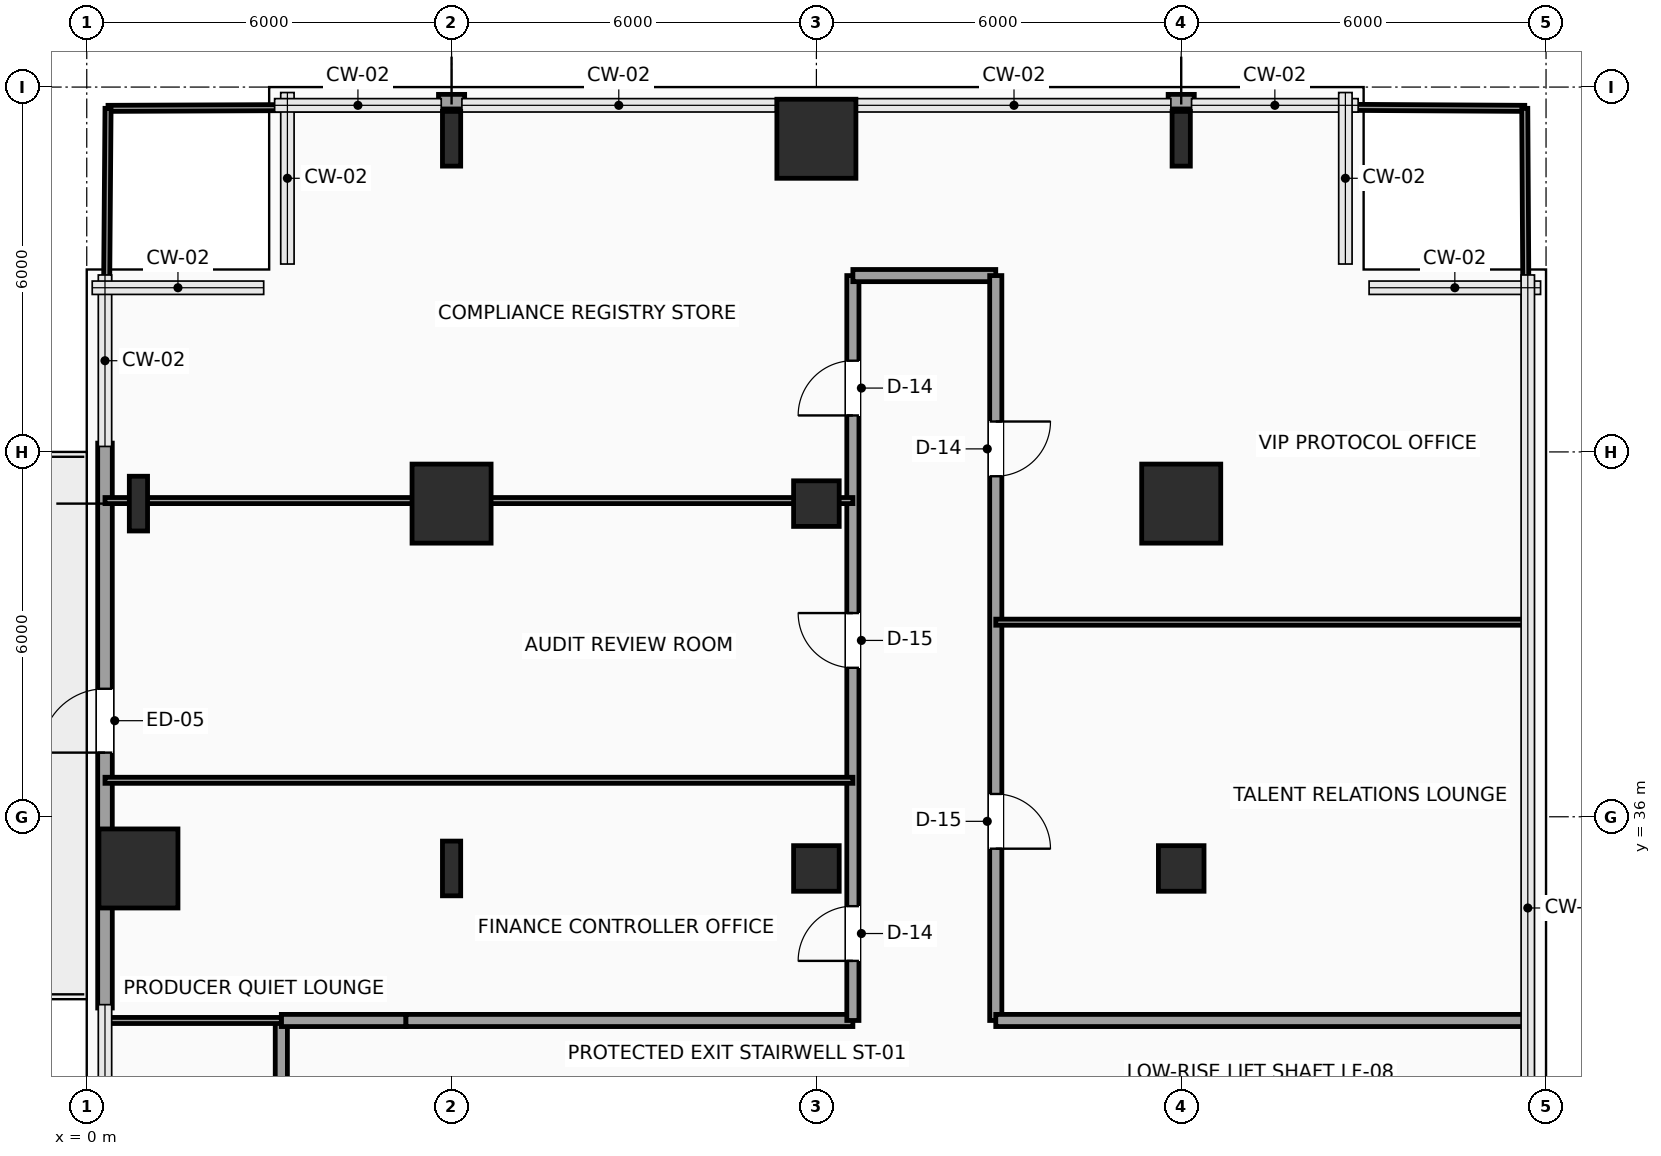
"""IFC4 building model, lengths in metres.
Left out: names, types, materials, properties, quantities, classifications, styles, units other than length and angle.
Written with IfcOpenShell. Run it as: python <this file> out.ifc"""

import sys

from ifc_helpers import new_model, si_unit, direction, frame, frame_2d, origin, origin_2d, place, context, subcontext, project, spatial, rectangle, hollow_rectangle, i_section, extrude, element, fill, save


model = new_model("IFC4")
c1 = context("Model", 3, precision=1e-05, world=origin(), true_north=direction((0.0, 1.0)))
c2 = subcontext(c1, "Body", "Model", "MODEL_VIEW")
j1 = project(units=[si_unit("LENGTHUNIT", "METRE"), si_unit("PLANEANGLEUNIT", "RADIAN")], contexts=[c1])
p1 = place(None, origin())
s1 = spatial("IfcSite", under=j1, at=p1, CompositionType="ELEMENT")
p2 = place(p1, origin())
s2 = spatial("IfcBuilding", under=s1, at=p2, CompositionType="ELEMENT")
p3 = place(p2, frame((0.0, 0.0, 87.0)))
s3 = spatial("IfcBuildingStorey", under=s2, at=p3, CompositionType="ELEMENT", Elevation=87.0)
p4 = place(p3, frame((0.85, 35.15, 0.0), z_axis=(0.0, 0.0, 1.0), x_axis=(1.0, 0.0, 0.0)))
e1 = element("IfcColumn", 1, at=p4, inside=s3, PredefinedType="COLUMN", context=c2, shape_type="SweptSolid", body=[
    extrude(rectangle(XDim=1.3, YDim=1.3, at=origin_2d()), origin(), (0.0, 0.0, 1.0), 3.9),
])
for number, where, z_axis, x_axis in (
    (2, (0.85, 41.15, 0.0), (0.0, 0.0, 1.0), (1.0, 0.0, 0.0)),
    (3, (6.0, 35.15, 0.0), (0.0, 0.0, 1.0), (1.0, 0.0, 0.0)),
):
    element("IfcColumn", number, at=place(p3, frame(where, z_axis=z_axis, x_axis=x_axis)), inside=s3, PredefinedType="COLUMN", context=c2, shape_type="SweptSolid", body=[
        extrude(i_section(OverallWidth=0.3, OverallDepth=0.9, WebThickness=0.019, FlangeThickness=0.035, FilletRadius=0.03, at=origin_2d()), origin(), (0.0, 0.0, 1.0), 3.9),
    ])
p5 = place(p3, frame((6.0, 41.15, 0.0), z_axis=(0.0, 0.0, 1.0), x_axis=(1.0, 0.0, 0.0)))
e4 = element("IfcColumn", 4, at=p5, inside=s3, PredefinedType="COLUMN", context=c2, shape_type="SweptSolid", body=[
    extrude(rectangle(XDim=1.3, YDim=1.3, at=origin_2d()), origin(), (0.0, 0.0, 1.0), 3.9),
])
p6 = place(p3, frame((6.0, 47.15, 0.0), z_axis=(0.0, 0.0, 1.0), x_axis=(1.0, 0.0, 0.0)))
e5 = element("IfcColumn", 5, at=p6, inside=s3, PredefinedType="COLUMN", context=c2, shape_type="SweptSolid", body=[
    extrude(i_section(OverallWidth=0.3, OverallDepth=0.9, WebThickness=0.019, FlangeThickness=0.035, FilletRadius=0.03, at=origin_2d()), origin(), (0.0, 0.0, 1.0), 3.9),
])
for number, where, z_axis, x_axis in (
    (6, (12.0, 35.15, 0.0), (0.0, 0.0, 1.0), (1.0, 0.0, 0.0)),
    (7, (12.0, 41.15, 0.0), (0.0, 0.0, 1.0), (1.0, 0.0, 0.0)),
):
    element("IfcColumn", number, at=place(p3, frame(where, z_axis=z_axis, x_axis=x_axis)), inside=s3, PredefinedType="COLUMN", context=c2, shape_type="SweptSolid", body=[
        extrude(hollow_rectangle(XDim=0.75, YDim=0.75, WallThickness=0.035, InnerFilletRadius=0.035, OuterFilletRadius=0.05, at=origin_2d()), origin(), (0.0, 0.0, 1.0), 3.9),
    ])
p7 = place(p3, frame((12.0, 47.15, 0.0), z_axis=(0.0, 0.0, 1.0), x_axis=(1.0, 0.0, 0.0)))
e8 = element("IfcColumn", 8, at=p7, inside=s3, PredefinedType="COLUMN", context=c2, shape_type="SweptSolid", body=[
    extrude(rectangle(XDim=1.3, YDim=1.3, at=origin_2d()), origin(), (0.0, 0.0, 1.0), 3.9),
])
p8 = place(p3, frame((18.0, 35.15, 0.0), z_axis=(0.0, 0.0, 1.0), x_axis=(1.0, 0.0, 0.0)))
e9 = element("IfcColumn", 9, at=p8, inside=s3, PredefinedType="COLUMN", context=c2, shape_type="SweptSolid", body=[
    extrude(hollow_rectangle(XDim=0.75, YDim=0.75, WallThickness=0.035, InnerFilletRadius=0.035, OuterFilletRadius=0.05, at=origin_2d()), origin(), (0.0, 0.0, 1.0), 3.9),
])
p9 = place(p3, frame((18.0, 41.15, 0.0), z_axis=(0.0, 0.0, 1.0), x_axis=(1.0, 0.0, 0.0)))
e10 = element("IfcColumn", 10, at=p9, inside=s3, PredefinedType="COLUMN", context=c2, shape_type="SweptSolid", body=[
    extrude(rectangle(XDim=1.3, YDim=1.3, at=origin_2d()), origin(), (0.0, 0.0, 1.0), 3.9),
])
p10 = place(p3, frame((18.0, 47.15, 0.0), z_axis=(0.0, 0.0, 1.0), x_axis=(1.0, 0.0, 0.0)))
e11 = element("IfcColumn", 11, at=p10, inside=s3, PredefinedType="COLUMN", context=c2, shape_type="SweptSolid", body=[
    extrude(i_section(OverallWidth=0.3, OverallDepth=0.9, WebThickness=0.019, FlangeThickness=0.035, FilletRadius=0.03, at=origin_2d()), origin(), (0.0, 0.0, 1.0), 3.9),
])
p11 = place(p3, frame((0.3, 32.855, 0.0), z_axis=(0.0, 0.0, 1.0), x_axis=(0.0, 1.0, 0.0)))
e12 = element("IfcWall", 12, at=p11, inside=s3, PredefinedType="SOLIDWALL", context=c2, shape_type="SweptSolid", body=[
    extrude(rectangle(XDim=9.29, YDim=0.24, at=frame_2d((4.645, 0.0))), origin(), (0.0, 0.0, 1.0), 3.65),
])
p12 = place(p11, frame((4.2, 0.0, 0.0)))
e13 = element("IfcOpeningElement", 13, at=p12, cuts=e12, PredefinedType="OPENING", context=c2, shape_type="SweptSolid", body=[
    extrude(rectangle(XDim=1.05, YDim=2.2, at=frame_2d((0.525, 1.1))), frame((0.0, 0.13, 0.0), z_axis=(0.0, -1.0, 0.0), x_axis=(1.0, 0.0, 0.0)), (0.0, 0.0, 1.0), 0.26),
])
for number, where, z_axis, x_axis in (
    (14, (5.785, 47.76, 0.0), (0.0, 0.0, 1.0), (1.0, 0.0, 0.0)),
    (15, (17.785, 47.76, 0.0), (0.0, 0.0, 1.0), (1.0, 0.0, 0.0)),
):
    element("IfcWall", number, at=place(p3, frame(where, z_axis=z_axis, x_axis=x_axis)), inside=s3, PredefinedType="SOLIDWALL", context=c2, shape_type="SweptSolid", body=[
        extrude(rectangle(XDim=0.43, YDim=0.24, at=frame_2d((0.215, 0.0))), origin(), (0.0, 0.0, 1.0), 3.65),
    ])
p13 = place(p3, frame((3.2, 30.25, 0.0), z_axis=(0.0, 0.0, 1.0), x_axis=(0.0, 1.0, 0.0)))
e16 = element("IfcWall", 16, at=p13, inside=s3, PredefinedType="SOLIDWALL", context=c2, shape_type="SweptSolid", body=[
    extrude(rectangle(XDim=2.4, YDim=0.2, at=frame_2d((1.2, 0.0))), origin(), (0.0, 0.0, 1.0), 3.65),
])
p14 = place(p3, frame((3.2, 32.65, 0.0), z_axis=(0.0, 0.0, 1.0), x_axis=(1.0, 0.0, 0.0)))
e17 = element("IfcWall", 17, at=p14, inside=s3, PredefinedType="SOLIDWALL", context=c2, shape_type="SweptSolid", body=[
    extrude(rectangle(XDim=2.05, YDim=0.2, at=frame_2d((1.025, 0.0))), origin(), (0.0, 0.0, 1.0), 3.65),
])
p15 = place(p3, frame((5.25, 32.65, 0.0), z_axis=(0.0, 0.0, 1.0), x_axis=(1.0, 0.0, 0.0)))
e18 = element("IfcWall", 18, at=p15, inside=s3, PredefinedType="SOLIDWALL", context=c2, shape_type="SweptSolid", body=[
    extrude(rectangle(XDim=7.35, YDim=0.2, at=frame_2d((3.675, 0.0))), origin(), (0.0, 0.0, 1.0), 3.65),
])
p16 = place(p3, frame((12.6, 32.65, 0.0), z_axis=(0.0, 0.0, 1.0), x_axis=(0.0, 1.0, 0.0)))
e19 = element("IfcWall", 19, at=p16, inside=s3, PredefinedType="SOLIDWALL", context=c2, shape_type="SweptSolid", body=[
    extrude(rectangle(XDim=12.25, YDim=0.2, at=frame_2d((6.125, 0.0))), origin(), (0.0, 0.0, 1.0), 3.65),
])
p17 = place(p16, frame((0.98, 0.0, 0.0)))
e20 = element("IfcOpeningElement", 20, at=p17, cuts=e19, PredefinedType="OPENING", context=c2, shape_type="SweptSolid", body=[
    extrude(rectangle(XDim=0.9, YDim=2.1, at=frame_2d((0.45, 1.05))), frame((0.0, 0.11, 0.0), z_axis=(0.0, -1.0, 0.0), x_axis=(1.0, 0.0, 0.0)), (0.0, 0.0, 1.0), 0.22),
])
p18 = place(p16, frame((5.8, 0.0, 0.0)))
e21 = element("IfcOpeningElement", 21, at=p18, cuts=e19, PredefinedType="OPENING", context=c2, shape_type="SweptSolid", body=[
    extrude(rectangle(XDim=0.9, YDim=2.1, at=frame_2d((0.45, 1.05))), frame((0.0, 0.11, 0.0), z_axis=(0.0, -1.0, 0.0), x_axis=(1.0, 0.0, 0.0)), (0.0, 0.0, 1.0), 0.22),
])
p19 = place(p16, frame((9.95, 0.0, 0.0)))
e22 = element("IfcOpeningElement", 22, at=p19, cuts=e19, PredefinedType="OPENING", context=c2, shape_type="SweptSolid", body=[
    extrude(rectangle(XDim=0.9, YDim=2.1, at=frame_2d((0.45, 1.05))), frame((0.0, 0.11, 0.0), z_axis=(0.0, -1.0, 0.0), x_axis=(1.0, 0.0, 0.0)), (0.0, 0.0, 1.0), 0.22),
])
p20 = place(p3, frame((12.6, 44.9, 0.0), z_axis=(0.0, 0.0, 1.0), x_axis=(1.0, 0.0, 0.0)))
e23 = element("IfcWall", 23, at=p20, inside=s3, PredefinedType="SOLIDWALL", context=c2, shape_type="SweptSolid", body=[
    extrude(rectangle(XDim=2.35, YDim=0.2, at=frame_2d((1.175, 0.0))), origin(), (0.0, 0.0, 1.0), 3.65),
])
p21 = place(p3, frame((14.95, 44.9, 0.0), z_axis=(0.0, 0.0, 1.0), x_axis=(0.0, -1.0, 0.0)))
e24 = element("IfcWall", 24, at=p21, inside=s3, PredefinedType="SOLIDWALL", context=c2, shape_type="SweptSolid", body=[
    extrude(rectangle(XDim=12.25, YDim=0.2, at=frame_2d((6.125, 0.0))), origin(), (0.0, 0.0, 1.0), 3.65),
])
p22 = place(p21, frame((8.525, 0.0, 0.0)))
e25 = element("IfcOpeningElement", 25, at=p22, cuts=e24, PredefinedType="OPENING", context=c2, shape_type="SweptSolid", body=[
    extrude(rectangle(XDim=0.9, YDim=2.1, at=frame_2d((0.45, 1.05))), frame((0.0, 0.11, 0.0), z_axis=(0.0, -1.0, 0.0), x_axis=(1.0, 0.0, 0.0)), (0.0, 0.0, 1.0), 0.22),
])
p23 = place(p21, frame((2.4, 0.0, 0.0)))
e26 = element("IfcOpeningElement", 26, at=p23, cuts=e24, PredefinedType="OPENING", context=c2, shape_type="SweptSolid", body=[
    extrude(rectangle(XDim=0.9, YDim=2.1, at=frame_2d((0.45, 1.05))), frame((0.0, 0.11, 0.0), z_axis=(0.0, -1.0, 0.0), x_axis=(1.0, 0.0, 0.0)), (0.0, 0.0, 1.0), 0.22),
])
p24 = place(p3, frame((14.95, 32.65, 0.0), z_axis=(0.0, 0.0, 1.0), x_axis=(1.0, 0.0, 0.0)))
e27 = element("IfcWall", 27, at=p24, inside=s3, PredefinedType="SOLIDWALL", context=c2, shape_type="SweptSolid", body=[
    extrude(rectangle(XDim=8.75, YDim=0.2, at=frame_2d((4.375, 0.0))), origin(), (0.0, 0.0, 1.0), 3.65),
])
p25 = place(p3, frame((0.3, 36.6, 0.0), z_axis=(0.0, 0.0, 1.0), x_axis=(1.0, 0.0, 0.0)))
e28 = element("IfcWall", 28, at=p25, inside=s3, PredefinedType="PARTITIONING", context=c2, shape_type="SweptSolid", body=[
    extrude(rectangle(XDim=12.3, YDim=0.1, at=frame_2d((6.15, 0.0))), origin(), (0.0, 0.0, 1.0), 3.65),
])
p26 = place(p3, frame((0.3, 41.2, 0.0), z_axis=(0.0, 0.0, 1.0), x_axis=(1.0, 0.0, 0.0)))
e29 = element("IfcWall", 29, at=p26, inside=s3, PredefinedType="PARTITIONING", context=c2, shape_type="SweptSolid", body=[
    extrude(rectangle(XDim=12.3, YDim=0.1, at=frame_2d((6.15, 0.0))), origin(), (0.0, 0.0, 1.0), 2.992),
])
p27 = place(p3, frame((0.35, 47.65, 0.0), z_axis=(0.0, 0.0, 1.0), x_axis=(0.999991644778, 0.004087832518, 0.0)))
e30 = element("IfcWall", 30, at=p27, inside=s3, PredefinedType="PARTITIONING", context=c2, shape_type="SweptSolid", body=[
    extrude(rectangle(XDim=5.435, YDim=0.1, at=frame_2d((2.717, 0.0))), origin(), (0.0, 0.0, 1.0), 3.65),
])
p28 = place(p3, frame((6.215, 47.674, 0.0), z_axis=(0.0, 0.0, 1.0), x_axis=(0.999991630701, 0.004091274595, 0.0)))
e31 = element("IfcWall", 31, at=p28, inside=s3, PredefinedType="PARTITIONING", context=c2, shape_type="SweptSolid", body=[
    extrude(rectangle(XDim=6.385, YDim=0.1, at=frame_2d((3.192, 0.0))), origin(), (0.0, 0.0, 1.0), 3.65),
])
p29 = place(p3, frame((0.307, 42.145, 0.0), z_axis=(0.0, 0.0, 1.0), x_axis=(0.007760986763, 0.999969883089, 0.0)))
e32 = element("IfcWall", 32, at=p29, inside=s3, PredefinedType="PARTITIONING", context=c2, shape_type="SweptSolid", body=[
    extrude(rectangle(XDim=5.505, YDim=0.1, at=frame_2d((2.752, 0.0))), origin(), (0.0, 0.0, 1.0), 3.65),
])
p30 = place(p3, frame((14.95, 39.2, 0.0), z_axis=(0.0, 0.0, 1.0), x_axis=(1.0, 0.0, 0.0)))
e33 = element("IfcWall", 33, at=p30, inside=s3, PredefinedType="PARTITIONING", context=c2, shape_type="SweptSolid", body=[
    extrude(rectangle(XDim=8.75, YDim=0.1, at=frame_2d((4.375, 0.0))), origin(), (0.0, 0.0, 1.0), 3.65),
])
p31 = place(p3, frame((14.95, 47.7, 0.0), z_axis=(0.0, 0.0, 1.0), x_axis=(0.999983354582, -0.005769797172, 0.0)))
e34 = element("IfcWall", 34, at=p31, inside=s3, PredefinedType="PARTITIONING", context=c2, shape_type="SweptSolid", body=[
    extrude(rectangle(XDim=2.835, YDim=0.1, at=frame_2d((1.417, 0.0))), origin(), (0.0, 0.0, 1.0), 3.65),
])
p32 = place(p3, frame((18.215, 47.681, 0.0), z_axis=(0.0, 0.0, 1.0), x_axis=(0.999983469354, -0.005749871258, 0.0)))
e35 = element("IfcWall", 35, at=p32, inside=s3, PredefinedType="PARTITIONING", context=c2, shape_type="SweptSolid", body=[
    extrude(rectangle(XDim=5.435, YDim=0.1, at=frame_2d((2.717, 0.0))), origin(), (0.0, 0.0, 1.0), 3.65),
])
p33 = place(p3, frame((23.7, 39.2, 0.0), z_axis=(0.0, 0.0, 1.0), x_axis=(-0.005922868574, 0.99998245966, 0.0)))
e36 = element("IfcWall", 36, at=p33, inside=s3, PredefinedType="PARTITIONING", context=c2, shape_type="SweptSolid", body=[
    extrude(rectangle(XDim=8.45, YDim=0.1, at=frame_2d((4.225, 0.0))), origin(), (0.0, 0.0, 1.0), 3.65),
])
p34 = place(p3, frame((0.3, 32.65, 0.0), z_axis=(0.0, 0.0, 1.0), x_axis=(1.0, 0.0, 0.0)))
e37 = element("IfcWall", 37, at=p34, inside=s3, PredefinedType="PARTITIONING", context=c2, shape_type="SweptSolid", body=[
    extrude(rectangle(XDim=2.9, YDim=0.1, at=frame_2d((1.45, 0.0))), origin(), (0.0, 0.0, 1.0), 3.65),
])
p35 = place(p12, origin())
e38 = element("IfcDoor", 38, at=p35, inside=s3, OperationType="SINGLE_SWING_LEFT", PredefinedType="DOOR", context=c2, shape_type="SweptSolid", body=[
    extrude(rectangle(XDim=1.05, YDim=2.2, at=frame_2d((0.525, 1.1))), frame((0.0, 0.025, 0.0), z_axis=(0.0, -1.0, 0.0), x_axis=(1.0, 0.0, 0.0)), (0.0, 0.0, 1.0), 0.05),
])
fill(e13, e38)
p36 = place(p17, origin())
e39 = element("IfcDoor", 39, at=p36, inside=s3, OperationType="SINGLE_SWING_LEFT", PredefinedType="DOOR", context=c2, shape_type="SweptSolid", body=[
    extrude(rectangle(XDim=0.9, YDim=2.1, at=frame_2d((0.45, 1.05))), frame((0.0, 0.025, 0.0), z_axis=(0.0, -1.0, 0.0), x_axis=(1.0, 0.0, 0.0)), (0.0, 0.0, 1.0), 0.05),
])
fill(e20, e39)
p37 = place(p18, origin())
e40 = element("IfcDoor", 40, at=p37, inside=s3, OperationType="SINGLE_SWING_RIGHT", PredefinedType="DOOR", context=c2, shape_type="SweptSolid", body=[
    extrude(rectangle(XDim=0.9, YDim=2.1, at=frame_2d((0.45, 1.05))), frame((0.0, 0.025, 0.0), z_axis=(0.0, -1.0, 0.0), x_axis=(1.0, 0.0, 0.0)), (0.0, 0.0, 1.0), 0.05),
])
fill(e21, e40)
p38 = place(p19, origin())
e41 = element("IfcDoor", 41, at=p38, inside=s3, OperationType="SINGLE_SWING_LEFT", PredefinedType="DOOR", context=c2, shape_type="SweptSolid", body=[
    extrude(rectangle(XDim=0.9, YDim=2.1, at=frame_2d((0.45, 1.05))), frame((0.0, 0.025, 0.0), z_axis=(0.0, -1.0, 0.0), x_axis=(1.0, 0.0, 0.0)), (0.0, 0.0, 1.0), 0.05),
])
fill(e22, e41)
p39 = place(p22, origin())
e42 = element("IfcDoor", 42, at=p39, inside=s3, OperationType="SINGLE_SWING_RIGHT", PredefinedType="DOOR", context=c2, shape_type="SweptSolid", body=[
    extrude(rectangle(XDim=0.9, YDim=2.1, at=frame_2d((0.45, 1.05))), frame((0.0, 0.025, 0.0), z_axis=(0.0, -1.0, 0.0), x_axis=(1.0, 0.0, 0.0)), (0.0, 0.0, 1.0), 0.05),
])
fill(e25, e42)
p40 = place(p23, origin())
e43 = element("IfcDoor", 43, at=p40, inside=s3, OperationType="SINGLE_SWING_LEFT", PredefinedType="DOOR", context=c2, shape_type="SweptSolid", body=[
    extrude(rectangle(XDim=0.9, YDim=2.1, at=frame_2d((0.45, 1.05))), frame((0.0, 0.025, 0.0), z_axis=(0.0, -1.0, 0.0), x_axis=(1.0, 0.0, 0.0)), (0.0, 0.0, 1.0), 0.05),
])
fill(e26, e43)
save(model, sys.argv[1])
